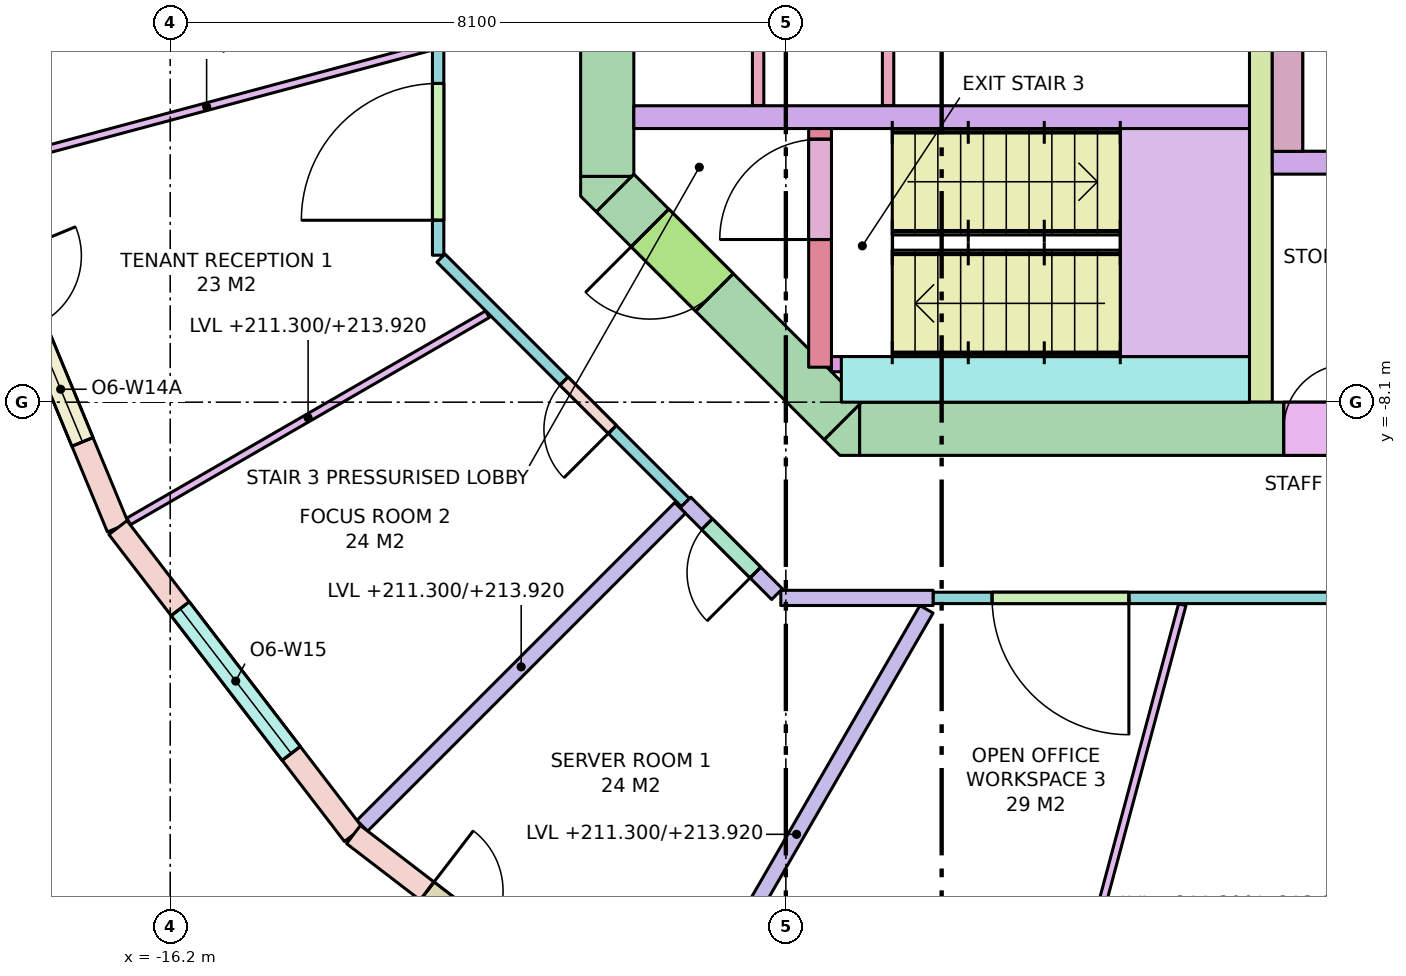
"""IFC4 building model, lengths in metres.
Left out: names, types, materials, properties, quantities, classifications, styles, units other than length and angle.
Written with IfcOpenShell. Run it as: python <this file> out.ifc"""

import sys

from ifc_helpers import new_model, si_unit, direction, frame, frame_2d, origin, place, context, subcontext, project, spatial, polyline, rectangle, outline, extrude, element, fill, save


model = new_model("IFC4")
c1 = context("Model", 3, precision=1e-05, world=origin(), true_north=direction((0.0, 1.0)))
c2 = subcontext(c1, "Body", "Model", "MODEL_VIEW")
j1 = project(units=[si_unit("LENGTHUNIT", "METRE"), si_unit("PLANEANGLEUNIT", "RADIAN")], contexts=[c1])
p1 = place(None, origin())
s1 = spatial("IfcSite", under=j1, at=p1, CompositionType="ELEMENT")
p2 = place(p1, origin())
s2 = spatial("IfcBuilding", under=s1, at=p2, CompositionType="ELEMENT")
p3 = place(p2, frame((0.0, 0.0, 211.3)))
s3 = spatial("IfcBuildingStorey", under=s2, at=p3, CompositionType="ELEMENT", Elevation=211.3)
p4 = place(p3, frame((-7.13, -8.45, -0.28), z_axis=(0.0, 0.0, 1.0), x_axis=(1.0, 0.0, 0.0)))
e1 = element("IfcWall", 1, at=p4, inside=s3, PredefinedType="SHEAR", context=c2, shape_type="SweptSolid", body=[
    extrude(rectangle(XDim=14.26, YDim=0.7, at=frame_2d((7.13, 0.0))), origin(), (0.0, 0.0, 1.0), 3.7),
])
p5 = place(p4, frame((8.08, 0.0, 0.28)))
e2 = element("IfcOpeningElement", 2, at=p5, cuts=e1, PredefinedType="OPENING", context=c2, shape_type="SweptSolid", body=[
    extrude(rectangle(XDim=0.7, YDim=2.1, at=frame_2d((0.35, 1.05))), frame((0.0, 0.36, 0.0), z_axis=(0.0, -1.0, 0.0), x_axis=(1.0, 0.0, 0.0)), (0.0, 0.0, 1.0), 0.72),
])
p6 = place(p4, frame((5.58, 0.0, 0.28)))
e3 = element("IfcOpeningElement", 3, at=p6, cuts=e1, PredefinedType="OPENING", context=c2, shape_type="SweptSolid", body=[
    extrude(rectangle(XDim=0.85, YDim=2.1, at=frame_2d((0.425, 1.05))), frame((0.0, 0.36, 0.0), z_axis=(0.0, -1.0, 0.0), x_axis=(1.0, 0.0, 0.0)), (0.0, 0.0, 1.0), 0.72),
])
p7 = place(p4, frame((6.88, 0.0, 0.28)))
e4 = element("IfcOpeningElement", 4, at=p7, cuts=e1, PredefinedType="OPENING", context=c2, shape_type="SweptSolid", body=[
    extrude(rectangle(XDim=0.85, YDim=2.1, at=frame_2d((0.425, 1.05))), frame((0.0, 0.36, 0.0), z_axis=(0.0, -1.0, 0.0), x_axis=(1.0, 0.0, 0.0)), (0.0, 0.0, 1.0), 0.72),
])
p8 = place(p4, frame((9.521, 0.0, 0.28)))
e5 = element("IfcOpeningElement", 5, at=p8, cuts=e1, PredefinedType="OPENING", context=c2, shape_type="SweptSolid", body=[
    extrude(rectangle(XDim=0.9, YDim=2.1, at=frame_2d((0.45, 1.05))), frame((0.0, 0.36, 0.0), z_axis=(0.0, -1.0, 0.0), x_axis=(1.0, 0.0, 0.0)), (0.0, 0.0, 1.0), 0.72),
])
p9 = place(p4, frame((11.278, 0.0, 0.28)))
e6 = element("IfcOpeningElement", 6, at=p9, cuts=e1, PredefinedType="OPENING", context=c2, shape_type="SweptSolid", body=[
    extrude(rectangle(XDim=0.9, YDim=2.1, at=frame_2d((0.45, 1.05))), frame((0.0, 0.36, 0.0), z_axis=(0.0, -1.0, 0.0), x_axis=(1.0, 0.0, 0.0)), (0.0, 0.0, 1.0), 0.72),
])
p10 = place(p4, frame((12.84, 0.0, 0.28)))
e7 = element("IfcOpeningElement", 7, at=p10, cuts=e1, PredefinedType="OPENING", context=c2, shape_type="SweptSolid", body=[
    extrude(rectangle(XDim=0.9, YDim=2.1, at=frame_2d((0.45, 1.05))), frame((0.0, 0.36, 0.0), z_axis=(0.0, -1.0, 0.0), x_axis=(1.0, 0.0, 0.0)), (0.0, 0.0, 1.0), 0.72),
])
p11 = place(p3, frame((-10.45, -5.13, -0.28), z_axis=(0.0, 0.0, 1.0), x_axis=(0.0, 1.0, 0.0)))
e8 = element("IfcWall", 8, at=p11, inside=s3, PredefinedType="SHEAR", context=c2, shape_type="SweptSolid", body=[
    extrude(rectangle(XDim=10.26, YDim=0.7, at=frame_2d((5.13, 0.0))), origin(), (0.0, 0.0, 1.0), 3.7),
])
p12 = place(p11, frame((4.13, 0.0, 0.28)))
e9 = element("IfcOpeningElement", 9, at=p12, cuts=e8, PredefinedType="OPENING", context=c2, shape_type="SweptSolid", body=[
    extrude(rectangle(XDim=2.0, YDim=2.1, at=frame_2d((1.0, 1.05))), frame((0.0, 0.36, 0.0), z_axis=(0.0, -1.0, 0.0), x_axis=(1.0, 0.0, 0.0)), (0.0, 0.0, 1.0), 0.72),
])
p13 = place(p3, frame((-7.347, -8.347, -0.28), z_axis=(0.0, 0.0, 1.0), x_axis=(-0.707106781187, 0.707106781187, 0.0)))
e10 = element("IfcWall", 10, at=p13, inside=s3, PredefinedType="SHEAR", context=c2, shape_type="SweptSolid", body=[
    extrude(rectangle(XDim=4.243, YDim=0.7, at=frame_2d((2.121, 0.0))), origin(), (0.0, 0.0, 1.0), 3.7),
])
p14 = place(p13, frame((2.393, 0.0, 0.28)))
e11 = element("IfcOpeningElement", 11, at=p14, cuts=e10, PredefinedType="OPENING", context=c2, shape_type="SweptSolid", body=[
    extrude(rectangle(XDim=1.2, YDim=2.1, at=frame_2d((0.6, 1.05))), frame((0.0, 0.36, 0.0), z_axis=(0.0, -1.0, 0.0), x_axis=(1.0, 0.0, 0.0)), (0.0, 0.0, 1.0), 0.72),
])
p15 = place(p3, frame((0.0, 0.0, -0.28)))
e12 = element("IfcWall", 12, at=p15, inside=s3, PredefinedType="SHEAR", context=c2, shape_type="SweptSolid", body=[
    extrude(outline(polyline([(-7.39, -8.8), (-7.595, -8.595), (-7.595, -8.595), (-7.595, -8.595), (-7.13, -8.13), (-7.13, -8.8), (-7.13, -8.8), (-7.39, -8.8)])), origin(), (0.0, 0.0, 1.0), 3.7),
])
p16 = place(p3, frame((0.0, 0.0, -0.28)))
e13 = element("IfcWall", 13, at=p16, inside=s3, PredefinedType="SHEAR", context=c2, shape_type="SweptSolid", body=[
    extrude(outline(polyline([(-10.8, -5.39), (-10.8, -5.13), (-10.8, -5.13), (-10.13, -5.13), (-10.595, -5.595), (-10.595, -5.595), (-10.595, -5.595), (-10.8, -5.39)])), origin(), (0.0, 0.0, 1.0), 3.7),
])
p17 = place(p3, frame((-10.1, -4.35, 0.0), z_axis=(0.0, 0.0, 1.0), x_axis=(1.0, 0.0, 0.0)))
e14 = element("IfcWall", 14, at=p17, inside=s3, PredefinedType="SOLIDWALL", context=c2, shape_type="SweptSolid", body=[
    extrude(rectangle(XDim=8.1, YDim=0.3, at=frame_2d((4.05, 0.0))), origin(), (0.0, 0.0, 1.0), 3.42),
])
p18 = place(p3, frame((-1.85, -8.1, 0.0), z_axis=(0.0, 0.0, 1.0), x_axis=(0.0, 1.0, 0.0)))
e15 = element("IfcWall", 15, at=p18, inside=s3, PredefinedType="SHEAR", context=c2, shape_type="SweptSolid", body=[
    extrude(rectangle(XDim=6.6, YDim=0.3, at=frame_2d((3.3, 0.0))), origin(), (0.0, 0.0, 1.0), 3.42),
])
p19 = place(p3, frame((-1.5, -4.8, 0.0), z_axis=(0.0, 0.0, 1.0), x_axis=(0.0, 1.0, 0.0)))
e16 = element("IfcWall", 16, at=p19, inside=s3, PredefinedType="SOLIDWALL", context=c2, shape_type="SweptSolid", body=[
    extrude(rectangle(XDim=3.0, YDim=0.4, at=frame_2d((1.5, 0.0))), origin(), (0.0, 0.0, 1.0), 3.42),
])
p20 = place(p3, frame((-1.7, -4.95, 0.0), z_axis=(0.0, 0.0, 1.0), x_axis=(1.0, 0.0, 0.0)))
e17 = element("IfcWall", 17, at=p20, inside=s3, PredefinedType="SOLIDWALL", context=c2, shape_type="SweptSolid", body=[
    extrude(rectangle(XDim=3.4, YDim=0.3, at=frame_2d((1.7, 0.0))), origin(), (0.0, 0.0, 1.0), 3.42),
])
p21 = place(p3, frame((-7.65, -7.64, 0.0), z_axis=(0.0, 0.0, 1.0), x_axis=(0.0, 1.0, 0.0)))
e18 = element("IfcWall", 18, at=p21, inside=s3, PredefinedType="SHEAR", context=c2, shape_type="SweptSolid", body=[
    extrude(rectangle(XDim=3.14, YDim=0.3, at=frame_2d((1.57, 0.0))), origin(), (0.0, 0.0, 1.0), 3.42),
])
p22 = place(p21, frame((1.68, 0.0, 0.0)))
e19 = element("IfcOpeningElement", 19, at=p22, cuts=e18, PredefinedType="OPENING", context=c2, shape_type="SweptSolid", body=[
    extrude(rectangle(XDim=1.32, YDim=2.1, at=frame_2d((0.66, 1.05))), frame((0.0, 0.16, 0.0), z_axis=(0.0, -1.0, 0.0), x_axis=(1.0, 0.0, 0.0)), (0.0, 0.0, 1.0), 0.32),
])
p23 = place(p3, frame((-7.5, -7.6, 0.0), z_axis=(0.0, 0.0, 1.0), x_axis=(1.0, 0.0, 0.0)))
e20 = element("IfcWall", 20, at=p23, inside=s3, PredefinedType="SHEAR", context=c2, shape_type="SweptSolid", body=[
    extrude(rectangle(XDim=0.6, YDim=0.2, at=frame_2d((0.3, 0.0))), origin(), (0.0, 0.0, 1.0), 3.42),
])
p24 = place(p3, frame((-7.37, -7.8, 0.0), z_axis=(0.0, 0.0, 1.0), x_axis=(1.0, 0.0, 0.0)))
e21 = element("IfcWall", 21, at=p24, inside=s3, PredefinedType="SHEAR", context=c2, shape_type="SweptSolid", body=[
    extrude(rectangle(XDim=5.37, YDim=0.6, at=frame_2d((2.685, 0.0))), origin(), (0.0, 0.0, 1.0), 3.42),
])
p25 = place(p3, frame((-18.836, -5.047, 0.0), z_axis=(0.0, 0.0, 1.0), x_axis=(0.382724538613, -0.923862504675, 0.0)))
e22 = element("IfcWall", 22, at=p25, inside=s3, PredefinedType="STANDARD", context=c2, shape_type="SweptSolid", body=[
    extrude(rectangle(XDim=5.091, YDim=0.3, at=frame_2d((2.545, 0.0))), origin(), (0.0, 0.0, 1.0), 3.42),
])
p26 = place(p25, frame((1.22, 0.0, 0.0)))
e23 = element("IfcOpeningElement", 23, at=p26, cuts=e22, PredefinedType="OPENING", context=c2, shape_type="SweptSolid", body=[
    extrude(rectangle(XDim=1.0, YDim=2.4, at=frame_2d((0.5, 1.2))), frame((0.0, 0.16, 0.0), z_axis=(0.0, -1.0, 0.0), x_axis=(1.0, 0.0, 0.0)), (0.0, 0.0, 1.0), 0.32),
])
p27 = place(p25, frame((2.37, 0.0, 0.8)))
e24 = element("IfcOpeningElement", 24, at=p27, cuts=e22, PredefinedType="OPENING", context=c2, shape_type="SweptSolid", body=[
    extrude(rectangle(XDim=1.5, YDim=2.4, at=frame_2d((0.75, 1.2))), frame((0.0, 0.16, 0.0), z_axis=(0.0, -1.0, 0.0), x_axis=(1.0, 0.0, 0.0)), (0.0, 0.0, 1.0), 0.32),
])
p28 = place(p3, frame((-16.887, -9.75, 0.0), z_axis=(0.0, 0.0, 1.0), x_axis=(0.608757714995, -0.79335619014, 0.0)))
e25 = element("IfcWall", 25, at=p28, inside=s3, PredefinedType="STANDARD", context=c2, shape_type="SweptSolid", body=[
    extrude(rectangle(XDim=5.091, YDim=0.3, at=frame_2d((2.545, 0.0))), origin(), (0.0, 0.0, 1.0), 3.42),
])
p29 = place(p28, frame((1.345, 0.0, 0.8)))
e26 = element("IfcOpeningElement", 26, at=p29, cuts=e25, PredefinedType="OPENING", context=c2, shape_type="SweptSolid", body=[
    extrude(rectangle(XDim=2.4, YDim=2.4, at=frame_2d((1.2, 1.2))), frame((0.0, 0.16, 0.0), z_axis=(0.0, -1.0, 0.0), x_axis=(1.0, 0.0, 0.0)), (0.0, 0.0, 1.0), 0.32),
])
p30 = place(p3, frame((-13.789, -13.789, 0.0), z_axis=(0.0, 0.0, 1.0), x_axis=(0.79335619014, -0.608757714995, 0.0)))
e27 = element("IfcWall", 27, at=p30, inside=s3, PredefinedType="STANDARD", context=c2, shape_type="SweptSolid", body=[
    extrude(rectangle(XDim=5.091, YDim=0.3, at=frame_2d((2.545, 0.0))), origin(), (0.0, 0.0, 1.0), 3.42),
])
p31 = place(p30, frame((1.22, 0.0, 0.0)))
e28 = element("IfcOpeningElement", 28, at=p31, cuts=e27, PredefinedType="OPENING", context=c2, shape_type="SweptSolid", body=[
    extrude(rectangle(XDim=1.0, YDim=2.4, at=frame_2d((0.5, 1.2))), frame((0.0, 0.16, 0.0), z_axis=(0.0, -1.0, 0.0), x_axis=(1.0, 0.0, 0.0)), (0.0, 0.0, 1.0), 0.32),
])
p32 = place(p30, frame((2.37, 0.0, 0.8)))
e29 = element("IfcOpeningElement", 29, at=p32, cuts=e27, PredefinedType="OPENING", context=c2, shape_type="SweptSolid", body=[
    extrude(rectangle(XDim=1.5, YDim=2.4, at=frame_2d((0.75, 1.2))), frame((0.0, 0.16, 0.0), z_axis=(0.0, -1.0, 0.0), x_axis=(1.0, 0.0, 0.0)), (0.0, 0.0, 1.0), 0.32),
])
for number, where, z_axis, x_axis in (
    (30, (-8.465, -4.2, 0.0), (0.0, 0.0, 1.0), (0.0, 1.0, 0.0)),
    (31, (-6.755, -4.2, 0.0), (0.0, 0.0, 1.0), (0.0, 1.0, 0.0)),
):
    element("IfcWall", number, at=place(p3, frame(where, z_axis=z_axis, x_axis=x_axis)), inside=s3, PredefinedType="PARTITIONING", context=c2, shape_type="SweptSolid", body=[
        extrude(rectangle(XDim=2.55, YDim=0.15, at=frame_2d((1.275, 0.0))), origin(), (0.0, 0.0, 1.0), 3.42),
    ])
p33 = place(p3, frame((8.167, -10.675, 0.0), z_axis=(0.0, 0.0, 1.0), x_axis=(-1.0, 0.0, 0.0)))
e32 = element("IfcWall", 32, at=p33, inside=s3, PredefinedType="PARTITIONING", context=c2, shape_type="SweptSolid", body=[
    extrude(rectangle(XDim=14.33, YDim=0.15, at=frame_2d((7.165, 0.0))), origin(), (0.0, 0.0, 1.0), 2.62),
])
p34 = place(p33, frame((7.267, 0.0, 0.0)))
e33 = element("IfcOpeningElement", 33, at=p34, cuts=e32, PredefinedType="OPENING", context=c2, shape_type="SweptSolid", body=[
    extrude(rectangle(XDim=1.8, YDim=2.1, at=frame_2d((0.9, 1.05))), frame((0.0, 0.085, 0.0), z_axis=(0.0, -1.0, 0.0), x_axis=(1.0, 0.0, 0.0)), (0.0, 0.0, 1.0), 0.17),
])
p35 = place(p33, frame((3.201, 0.0, 0.0)))
e34 = element("IfcOpeningElement", 34, at=p35, cuts=e32, PredefinedType="OPENING", context=c2, shape_type="SweptSolid", body=[
    extrude(rectangle(XDim=0.9, YDim=2.1, at=frame_2d((0.45, 1.05))), frame((0.0, 0.085, 0.0), z_axis=(0.0, -1.0, 0.0), x_axis=(1.0, 0.0, 0.0)), (0.0, 0.0, 1.0), 0.17),
])
p36 = place(p33, frame((11.753, 0.0, 0.0)))
e35 = element("IfcOpeningElement", 35, at=p36, cuts=e32, PredefinedType="OPENING", context=c2, shape_type="SweptSolid", body=[
    extrude(rectangle(XDim=1.8, YDim=2.1, at=frame_2d((0.9, 1.05))), frame((0.0, 0.085, 0.0), z_axis=(0.0, -1.0, 0.0), x_axis=(1.0, 0.0, 0.0)), (0.0, 0.0, 1.0), 0.17),
])
p37 = place(p3, frame((-6.163, -10.675, 0.0), z_axis=(0.0, 0.0, 1.0), x_axis=(-1.0, 0.0, 0.0)))
e36 = element("IfcWall", 36, at=p37, inside=s3, PredefinedType="PARTITIONING", context=c2, shape_type="SweptSolid", body=[
    extrude(rectangle(XDim=2.003, YDim=0.2, at=frame_2d((1.002, 0.0))), origin(), (0.0, 0.0, 1.0), 2.62),
])
p38 = place(p3, frame((-8.216, -10.625, 0.0), z_axis=(0.0, 0.0, 1.0), x_axis=(-0.70717842684, 0.707035128273, 0.0)))
e37 = element("IfcWall", 37, at=p38, inside=s3, PredefinedType="PARTITIONING", context=c2, shape_type="SweptSolid", body=[
    extrude(rectangle(XDim=1.704, YDim=0.2, at=frame_2d((0.852, 0.0))), origin(), (0.0, 0.0, 1.0), 2.62),
])
p39 = place(p38, frame((0.402, 0.0, 0.0)))
e38 = element("IfcOpeningElement", 38, at=p39, cuts=e37, PredefinedType="OPENING", context=c2, shape_type="SweptSolid", body=[
    extrude(rectangle(XDim=0.9, YDim=2.1, at=frame_2d((0.45, 1.05))), frame((0.0, 0.11, 0.0), z_axis=(0.0, -1.0, 0.0), x_axis=(1.0, 0.0, 0.0)), (0.0, 0.0, 1.0), 0.22),
])
p40 = place(p3, frame((-9.421, -9.421, 0.0), z_axis=(0.0, 0.0, 1.0), x_axis=(-0.707079950597, 0.707133610758, 0.0)))
e39 = element("IfcWall", 39, at=p40, inside=s3, PredefinedType="PARTITIONING", context=c2, shape_type="SweptSolid", body=[
    extrude(rectangle(XDim=4.55, YDim=0.15, at=frame_2d((2.275, 0.0))), origin(), (0.0, 0.0, 1.0), 2.62),
])
p41 = place(p40, frame((1.361, 0.0, 0.0)))
e40 = element("IfcOpeningElement", 40, at=p41, cuts=e39, PredefinedType="OPENING", context=c2, shape_type="SweptSolid", body=[
    extrude(rectangle(XDim=0.9, YDim=2.1, at=frame_2d((0.45, 1.05))), frame((0.0, 0.085, 0.0), z_axis=(0.0, -1.0, 0.0), x_axis=(1.0, 0.0, 0.0)), (0.0, 0.0, 1.0), 0.17),
])
p42 = place(p3, frame((-12.675, -6.167, 0.0), z_axis=(0.0, 0.0, 1.0), x_axis=(0.0, 1.0, 0.0)))
e41 = element("IfcWall", 41, at=p42, inside=s3, PredefinedType="PARTITIONING", context=c2, shape_type="SweptSolid", body=[
    extrude(rectangle(XDim=12.333, YDim=0.15, at=frame_2d((6.167, 0.0))), origin(), (0.0, 0.0, 1.0), 2.62),
])
p43 = place(p42, frame((10.473, 0.0, 0.0)))
e42 = element("IfcOpeningElement", 42, at=p43, cuts=e41, PredefinedType="OPENING", context=c2, shape_type="SweptSolid", body=[
    extrude(rectangle(XDim=0.9, YDim=2.1, at=frame_2d((0.45, 1.05))), frame((0.0, 0.085, 0.0), z_axis=(0.0, -1.0, 0.0), x_axis=(1.0, 0.0, 0.0)), (0.0, 0.0, 1.0), 0.17),
])
p44 = place(p42, frame((7.416, 0.0, 0.0)))
e43 = element("IfcOpeningElement", 43, at=p44, cuts=e41, PredefinedType="OPENING", context=c2, shape_type="SweptSolid", body=[
    extrude(rectangle(XDim=0.9, YDim=2.1, at=frame_2d((0.45, 1.05))), frame((0.0, 0.085, 0.0), z_axis=(0.0, -1.0, 0.0), x_axis=(1.0, 0.0, 0.0)), (0.0, 0.0, 1.0), 0.17),
])
p45 = place(p42, frame((4.018, 0.0, 0.0)))
e44 = element("IfcOpeningElement", 44, at=p45, cuts=e41, PredefinedType="OPENING", context=c2, shape_type="SweptSolid", body=[
    extrude(rectangle(XDim=0.9, YDim=2.1, at=frame_2d((0.45, 1.05))), frame((0.0, 0.085, 0.0), z_axis=(0.0, -1.0, 0.0), x_axis=(1.0, 0.0, 0.0)), (0.0, 0.0, 1.0), 0.17),
])
p46 = place(p42, frame((0.46, 0.0, 0.0)))
e45 = element("IfcOpeningElement", 45, at=p46, cuts=e41, PredefinedType="OPENING", context=c2, shape_type="SweptSolid", body=[
    extrude(rectangle(XDim=1.8, YDim=2.1, at=frame_2d((0.9, 1.05))), frame((0.0, 0.085, 0.0), z_axis=(0.0, -1.0, 0.0), x_axis=(1.0, 0.0, 0.0)), (0.0, 0.0, 1.0), 0.17),
])
p47 = place(p3, frame((-12.764, -3.42, 0.0), z_axis=(0.0, 0.0, 1.0), x_axis=(-0.965925800266, -0.258819142221, 0.0)))
e46 = element("IfcWall", 46, at=p47, inside=s3, PredefinedType="PARTITIONING", context=c2, shape_type="SweptSolid", body=[
    extrude(rectangle(XDim=6.122, YDim=0.1, at=frame_2d((3.061, 0.0))), origin(), (0.0, 0.0, 1.0), 2.62),
])
p48 = place(p3, frame((-12.025, -6.943, 0.0), z_axis=(0.0, 0.0, 1.0), x_axis=(-0.866029712004, -0.499992537871, 0.0)))
e47 = element("IfcWall", 47, at=p48, inside=s3, PredefinedType="PARTITIONING", context=c2, shape_type="SweptSolid", body=[
    extrude(rectangle(XDim=5.451, YDim=0.1, at=frame_2d((2.726, 0.0))), origin(), (0.0, 0.0, 1.0), 2.62),
])
p49 = place(p3, frame((-9.491, -9.491, 0.0), z_axis=(0.0, 0.0, 1.0), x_axis=(-0.707106781187, -0.707106781187, 0.0)))
e48 = element("IfcWall", 48, at=p49, inside=s3, PredefinedType="PARTITIONING", context=c2, shape_type="SweptSolid", body=[
    extrude(rectangle(XDim=5.914, YDim=0.2, at=frame_2d((2.957, 0.0))), origin(), (0.0, 0.0, 1.0), 2.62),
])
p50 = place(p3, frame((-6.25, -10.824, 0.0), z_axis=(0.0, 0.0, 1.0), x_axis=(-0.500009887181, -0.866019695343, 0.0)))
e49 = element("IfcWall", 49, at=p50, inside=s3, PredefinedType="PARTITIONING", context=c2, shape_type="SweptSolid", body=[
    extrude(rectangle(XDim=6.838, YDim=0.2, at=frame_2d((3.419, 0.0))), origin(), (0.0, 0.0, 1.0), 2.62),
])
p51 = place(p3, frame((-2.884, -10.764, 0.0), z_axis=(0.0, 0.0, 1.0), x_axis=(-0.258818011497, -0.965926103242, 0.0)))
e50 = element("IfcWall", 50, at=p51, inside=s3, PredefinedType="PARTITIONING", context=c2, shape_type="SweptSolid", body=[
    extrude(rectangle(XDim=8.192, YDim=0.1, at=frame_2d((4.096, 0.0))), origin(), (0.0, 0.0, 1.0), 2.62),
])
p52 = place(p27, origin())
e51 = element("IfcWindow", 51, at=p52, inside=s3, PartitioningType="SINGLE_PANEL", PredefinedType="WINDOW", context=c2, shape_type="SweptSolid", body=[
    extrude(rectangle(XDim=1.5, YDim=2.4, at=frame_2d((0.75, 1.2))), frame((0.0, 0.03, 0.0), z_axis=(0.0, -1.0, 0.0), x_axis=(1.0, 0.0, 0.0)), (0.0, 0.0, 1.0), 0.06),
])
fill(e24, e51)
p53 = place(p29, origin())
e52 = element("IfcWindow", 52, at=p53, inside=s3, PartitioningType="SINGLE_PANEL", PredefinedType="WINDOW", context=c2, shape_type="SweptSolid", body=[
    extrude(rectangle(XDim=2.4, YDim=2.4, at=frame_2d((1.2, 1.2))), frame((0.0, 0.03, 0.0), z_axis=(0.0, -1.0, 0.0), x_axis=(1.0, 0.0, 0.0)), (0.0, 0.0, 1.0), 0.06),
])
fill(e26, e52)
p54 = place(p31, origin())
e53 = element("IfcDoor", 53, at=p54, inside=s3, OperationType="SINGLE_SWING_LEFT", PredefinedType="DOOR", context=c2, shape_type="SweptSolid", body=[
    extrude(rectangle(XDim=1.0, YDim=2.4, at=frame_2d((0.5, 1.2))), frame((0.0, 0.025, 0.0), z_axis=(0.0, -1.0, 0.0), x_axis=(1.0, 0.0, 0.0)), (0.0, 0.0, 1.0), 0.05),
])
fill(e28, e53)
p55 = place(p22, origin())
e54 = element("IfcDoor", 54, at=p55, inside=s3, OperationType="DOUBLE_DOOR_SINGLE_SWING", PredefinedType="DOOR", context=c2, shape_type="SweptSolid", body=[
    extrude(rectangle(XDim=1.32, YDim=2.1, at=frame_2d((0.66, 1.05))), frame((0.0, 0.025, 0.0), z_axis=(0.0, -1.0, 0.0), x_axis=(1.0, 0.0, 0.0)), (0.0, 0.0, 1.0), 0.05),
])
fill(e19, e54)
p56 = place(p14, origin())
e55 = element("IfcDoor", 55, at=p56, inside=s3, OperationType="SINGLE_SWING_RIGHT", PredefinedType="DOOR", context=c2, shape_type="SweptSolid", body=[
    extrude(rectangle(XDim=1.2, YDim=2.1, at=frame_2d((0.6, 1.05))), frame((0.0, 0.025, 0.0), z_axis=(0.0, -1.0, 0.0), x_axis=(1.0, 0.0, 0.0)), (0.0, 0.0, 1.0), 0.05),
])
fill(e11, e55)
p57 = place(p6, origin())
e56 = element("IfcDoor", 56, at=p57, inside=s3, OperationType="SINGLE_SWING_RIGHT", PredefinedType="DOOR", context=c2, shape_type="SweptSolid", body=[
    extrude(rectangle(XDim=0.85, YDim=2.1, at=frame_2d((0.425, 1.05))), frame((0.0, 0.025, 0.0), z_axis=(0.0, -1.0, 0.0), x_axis=(1.0, 0.0, 0.0)), (0.0, 0.0, 1.0), 0.05),
])
fill(e3, e56)
p58 = place(p46, origin())
e57 = element("IfcDoor", 57, at=p58, inside=s3, OperationType="DOUBLE_DOOR_SINGLE_SWING", PredefinedType="DOOR", context=c2, shape_type="SweptSolid", body=[
    extrude(rectangle(XDim=1.8, YDim=2.1, at=frame_2d((0.9, 1.05))), frame((0.0, 0.025, 0.0), z_axis=(0.0, -1.0, 0.0), x_axis=(1.0, 0.0, 0.0)), (0.0, 0.0, 1.0), 0.05),
])
fill(e45, e57)
p59 = place(p41, origin())
e58 = element("IfcDoor", 58, at=p59, inside=s3, OperationType="SINGLE_SWING_LEFT", PredefinedType="DOOR", context=c2, shape_type="SweptSolid", body=[
    extrude(rectangle(XDim=0.9, YDim=2.1, at=frame_2d((0.45, 1.05))), frame((0.0, 0.025, 0.0), z_axis=(0.0, -1.0, 0.0), x_axis=(1.0, 0.0, 0.0)), (0.0, 0.0, 1.0), 0.05),
])
fill(e40, e58)
p60 = place(p39, origin())
e59 = element("IfcDoor", 59, at=p60, inside=s3, OperationType="SINGLE_SWING_LEFT", PredefinedType="DOOR", context=c2, shape_type="SweptSolid", body=[
    extrude(rectangle(XDim=0.9, YDim=2.1, at=frame_2d((0.45, 1.05))), frame((0.0, 0.025, 0.0), z_axis=(0.0, -1.0, 0.0), x_axis=(1.0, 0.0, 0.0)), (0.0, 0.0, 1.0), 0.05),
])
fill(e38, e59)
p61 = place(p36, origin())
e60 = element("IfcDoor", 60, at=p61, inside=s3, OperationType="DOUBLE_DOOR_SINGLE_SWING", PredefinedType="DOOR", context=c2, shape_type="SweptSolid", body=[
    extrude(rectangle(XDim=1.8, YDim=2.1, at=frame_2d((0.9, 1.05))), frame((0.0, 0.025, 0.0), z_axis=(0.0, -1.0, 0.0), x_axis=(1.0, 0.0, 0.0)), (0.0, 0.0, 1.0), 0.05),
])
fill(e35, e60)
save(model, sys.argv[1])
